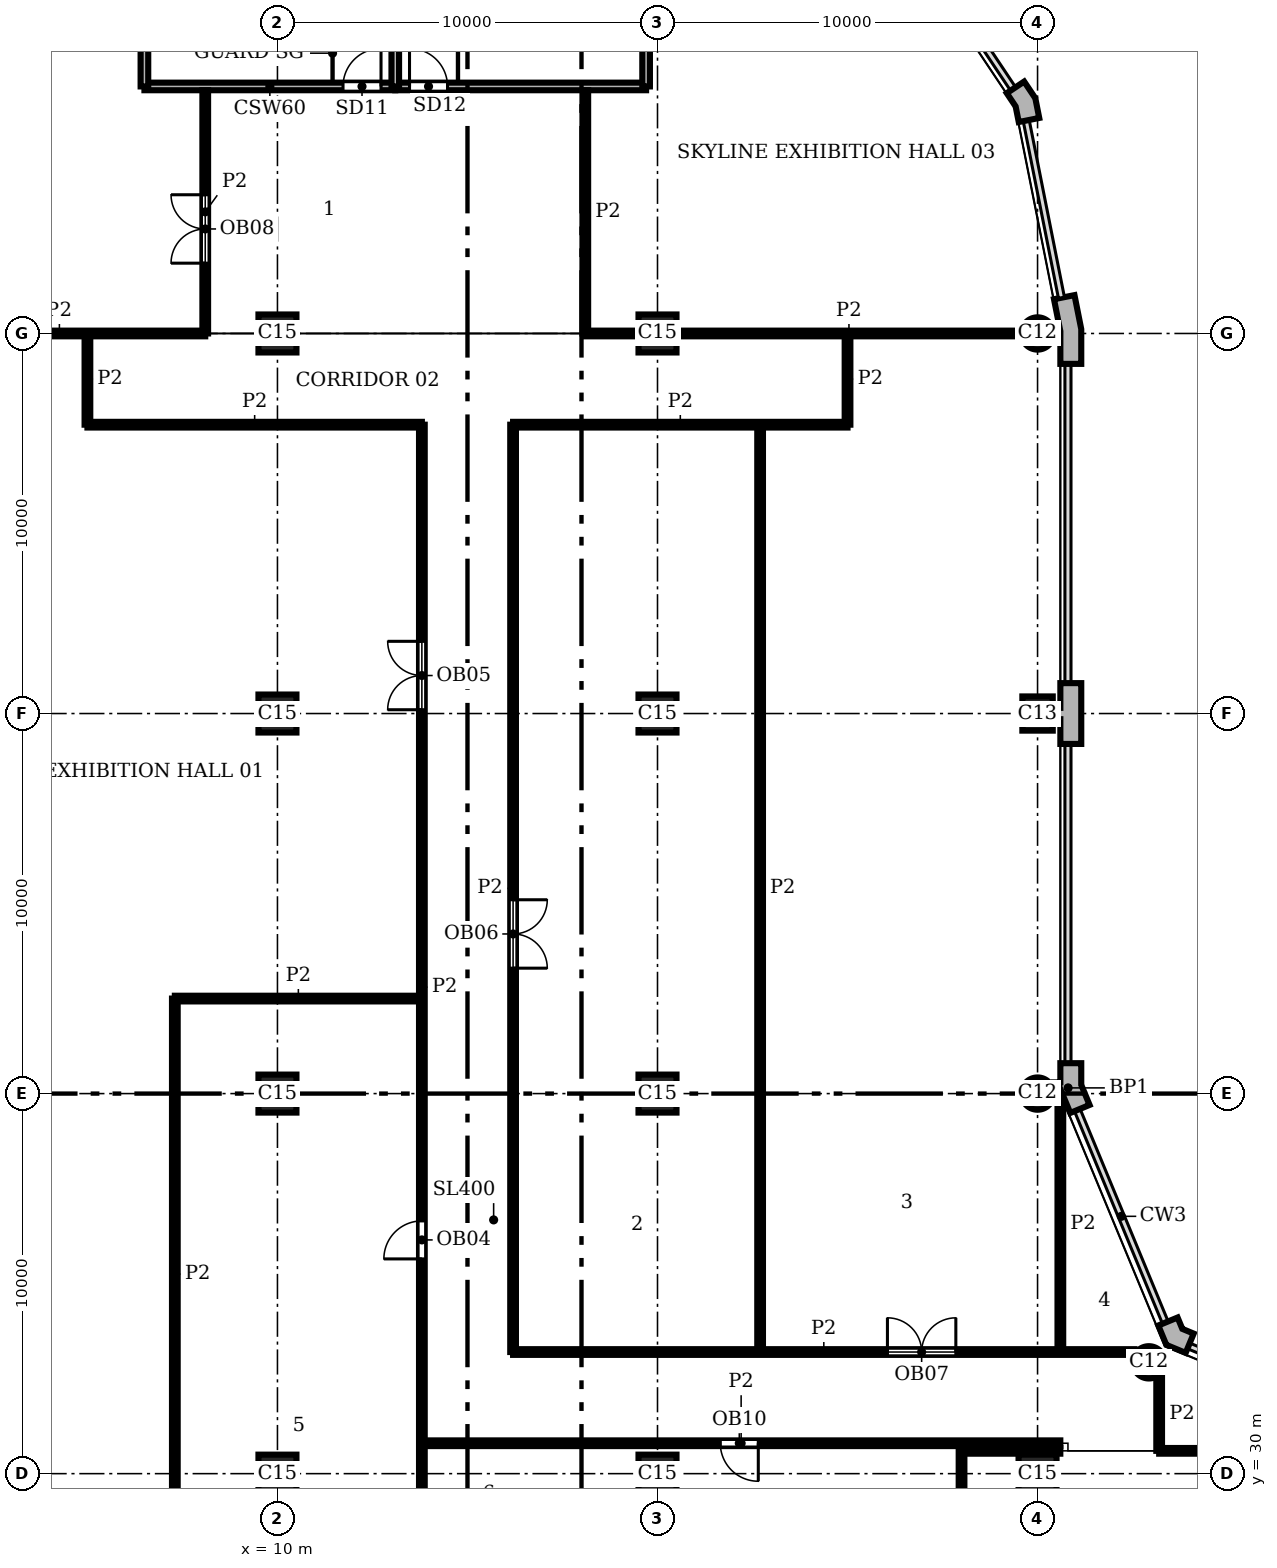
"""IFC4 building model, lengths in metres.
Left out: names, types, materials, properties, quantities, classifications, styles, units other than length and angle.
Written with IfcOpenShell. Run it as: python <this file> out.ifc"""

import sys

from ifc_helpers import new_model, si_unit, direction, frame, frame_2d, origin, origin_2d, place, context, subcontext, project, spatial, polyline, rectangle, circle, outline, extrude, element, fill, save


model = new_model("IFC4")
c1 = context("Model", 3, precision=1e-05, world=origin(), true_north=direction((0.0, 1.0)))
c2 = subcontext(c1, "Body", "Model", "MODEL_VIEW")
j1 = project(units=[si_unit("LENGTHUNIT", "METRE"), si_unit("PLANEANGLEUNIT", "RADIAN")], contexts=[c1])
p1 = place(None, origin())
s1 = spatial("IfcSite", under=j1, at=p1, CompositionType="ELEMENT")
p2 = place(p1, origin())
s2 = spatial("IfcBuilding", under=s1, at=p2, CompositionType="ELEMENT")
p3 = place(p2, frame((0.0, 0.0, 358.2)))
s3 = spatial("IfcBuildingStorey", under=s2, at=p3, CompositionType="ELEMENT", Elevation=358.2)
for number, where, z_axis, x_axis in (
    (1, (32.929, 32.929, 0.0), (0.0, 0.0, 1.0), (1.0, 0.0, 0.0)),
    (2, (30.0, 40.0, 0.0), (0.0, 0.0, 1.0), (1.0, 0.0, 0.0)),
):
    element("IfcColumn", number, at=place(p3, frame(where, z_axis=z_axis, x_axis=x_axis)), inside=s3, PredefinedType="COLUMN", context=c2, shape_type="SweptSolid", body=[
        extrude(circle(Radius=0.425, at=origin_2d()), origin(), (0.0, 0.0, 1.0), 7.2),
    ])
p4 = place(p3, frame((30.0, 50.0, 0.0), z_axis=(0.0, 0.0, 1.0), x_axis=(0.0, 1.0, 0.0)))
e3 = element("IfcColumn", 3, at=p4, inside=s3, PredefinedType="COLUMN", context=c2, shape_type="SweptSolid", body=[
    extrude(rectangle(XDim=0.9, YDim=0.8, at=origin_2d()), origin(), (0.0, 0.0, 1.0), 7.2),
])
p5 = place(p3, frame((30.0, 60.0, 0.0), z_axis=(0.0, 0.0, 1.0), x_axis=(1.0, 0.0, 0.0)))
e4 = element("IfcColumn", 4, at=p5, inside=s3, PredefinedType="COLUMN", context=c2, shape_type="SweptSolid", body=[
    extrude(circle(Radius=0.425, at=origin_2d()), origin(), (0.0, 0.0, 1.0), 7.2),
])
for number, where, z_axis, x_axis in (
    (5, (10.0, 30.0, 0.0), (0.0, 0.0, 1.0), (1.0, 0.0, 0.0)),
    (6, (10.0, 40.0, 0.0), (0.0, 0.0, 1.0), (1.0, 0.0, 0.0)),
    (7, (10.0, 50.0, 0.0), (0.0, 0.0, 1.0), (1.0, 0.0, 0.0)),
    (8, (10.0, 60.0, 0.0), (0.0, 0.0, 1.0), (1.0, 0.0, 0.0)),
    (9, (20.0, 30.0, 0.0), (0.0, 0.0, 1.0), (1.0, 0.0, 0.0)),
    (10, (20.0, 40.0, 0.0), (0.0, 0.0, 1.0), (1.0, 0.0, 0.0)),
    (11, (20.0, 50.0, 0.0), (0.0, 0.0, 1.0), (1.0, 0.0, 0.0)),
    (12, (20.0, 60.0, 0.0), (0.0, 0.0, 1.0), (1.0, 0.0, 0.0)),
    (13, (30.0, 30.0, 0.0), (0.0, 0.0, 1.0), (1.0, 0.0, 0.0)),
):
    element("IfcColumn", number, at=place(p3, frame(where, z_axis=z_axis, x_axis=x_axis)), inside=s3, PredefinedType="COLUMN", context=c2, shape_type="SweptSolid", body=[
        extrude(rectangle(XDim=1.0, YDim=1.0, at=origin_2d()), origin(), (0.0, 0.0, 1.0), 7.2),
    ])
p6 = place(p3, origin())
e14 = element("IfcWall", 14, at=p6, inside=s3, PredefinedType="SOLIDWALL", context=c2, shape_type="SweptSolid", body=[
    extrude(outline(polyline([(34.051, 33.547), (34.108, 33.685), (33.809, 33.809), (33.685, 34.108), (33.547, 34.051), (33.177, 33.898), (33.388, 33.388), (33.898, 33.177), (34.051, 33.547)])), origin(), (0.0, 0.0, 1.0), 7.2),
])
e15 = element("IfcWall", 15, at=p6, inside=s3, PredefinedType="SOLIDWALL", context=c2, shape_type="SweptSolid", body=[
    extrude(outline(polyline([(30.62, 39.995), (30.62, 40.071), (30.861, 39.49), (31.23, 39.644), (31.369, 39.701), (31.15, 40.229), (31.15, 40.8), (31.0, 40.8), (30.6, 40.8), (30.6, 40.295), (30.425, 40.295), (30.425, 39.995), (30.62, 39.995)])), origin(), (0.0, 0.0, 1.0), 7.2),
])
e16 = element("IfcWall", 16, at=p6, inside=s3, PredefinedType="SOLIDWALL", context=c2, shape_type="SweptSolid", body=[
    extrude(outline(polyline([(30.0, 49.85), (30.6, 49.85), (30.6, 49.2), (31.0, 49.2), (31.15, 49.2), (31.15, 50.0), (31.15, 50.8), (31.0, 50.8), (30.6, 50.8), (30.6, 50.15), (30.0, 50.15), (30.0, 49.85)])), origin(), (0.0, 0.0, 1.0), 7.2),
])
e17 = element("IfcWall", 17, at=p6, inside=s3, PredefinedType="SOLIDWALL", context=c2, shape_type="SweptSolid", body=[
    extrude(outline(polyline([(31.0, 59.2), (31.15, 59.2), (31.15, 60.113), (30.972, 61.009), (30.825, 60.98), (30.432, 60.902), (30.6, 60.059), (30.6, 59.2), (31.0, 59.2)])), origin(), (0.0, 0.0, 1.0), 7.2),
])
e18 = element("IfcWall", 18, at=p6, inside=s3, PredefinedType="SOLIDWALL", context=c2, shape_type="SweptSolid", body=[
    extrude(outline(polyline([(29.897, 65.641), (30.045, 65.67), (29.941, 66.189), (29.648, 66.629), (29.523, 66.545), (29.19, 66.323), (29.423, 65.974), (29.505, 65.563), (29.897, 65.641)])), origin(), (0.0, 0.0, 1.0), 7.2),
])
p7 = place(p3, frame((6.5, 66.5, 0.0), z_axis=(0.0, 0.0, 1.0), x_axis=(1.0, 0.0, 0.0)))
e19 = element("IfcWall", 19, at=p7, inside=s3, PredefinedType="SHEAR", context=c2, shape_type="SweptSolid", body=[
    extrude(rectangle(XDim=6.6, YDim=0.2, at=frame_2d((3.3, 0.0))), origin(), (0.0, 0.0, 1.0), 6.75),
])
p8 = place(p7, frame((5.225, 0.0, 0.0)))
e20 = element("IfcOpeningElement", 20, at=p8, cuts=e19, PredefinedType="OPENING", context=c2, shape_type="SweptSolid", body=[
    extrude(rectangle(XDim=1.0, YDim=2.1, at=frame_2d((0.5, 1.05))), frame((0.0, 0.11, 0.0), z_axis=(0.0, -1.0, 0.0), x_axis=(1.0, 0.0, 0.0)), (0.0, 0.0, 1.0), 0.22),
])
p9 = place(p3, frame((13.1, 66.5, 0.0), z_axis=(0.0, 0.0, 1.0), x_axis=(1.0, 0.0, 0.0)))
e21 = element("IfcWall", 21, at=p9, inside=s3, PredefinedType="SHEAR", context=c2, shape_type="SweptSolid", body=[
    extrude(rectangle(XDim=6.6, YDim=0.2, at=frame_2d((3.3, 0.0))), origin(), (0.0, 0.0, 1.0), 6.75),
])
p10 = place(p9, frame((0.375, 0.0, 0.0)))
e22 = element("IfcOpeningElement", 22, at=p10, cuts=e21, PredefinedType="OPENING", context=c2, shape_type="SweptSolid", body=[
    extrude(rectangle(XDim=1.0, YDim=2.1, at=frame_2d((0.5, 1.05))), frame((0.0, 0.11, 0.0), z_axis=(0.0, -1.0, 0.0), x_axis=(1.0, 0.0, 0.0)), (0.0, 0.0, 1.0), 0.22),
])
for number, where, z_axis, x_axis in (
    (23, (6.5, 66.5, 0.0), (0.0, 0.0, 1.0), (0.0, 1.0, 0.0)),
    (24, (13.1, 66.5, 0.0), (0.0, 0.0, 1.0), (0.0, 1.0, 0.0)),
    (25, (19.7, 66.5, 0.0), (0.0, 0.0, 1.0), (0.0, 1.0, 0.0)),
):
    element("IfcWall", number, at=place(p3, frame(where, z_axis=z_axis, x_axis=x_axis)), inside=s3, PredefinedType="SHEAR", context=c2, shape_type="SweptSolid", body=[
        extrude(rectangle(XDim=3.3, YDim=0.2, at=frame_2d((1.65, 0.0))), origin(), (0.0, 0.0, 1.0), 6.75),
    ])
p11 = place(p3, frame((5.0, 57.6, 0.0), z_axis=(0.0, 0.0, 1.0), x_axis=(0.0, 1.0, 0.0)))
e26 = element("IfcWall", 26, at=p11, inside=s3, PredefinedType="PARTITIONING", context=c2, shape_type="SweptSolid", body=[
    extrude(rectangle(XDim=2.4, YDim=0.15, at=frame_2d((1.2, 0.0))), origin(), (0.0, 0.0, 1.0), 6.75),
])
p12 = place(p3, frame((7.3, 28.0, 0.0), z_axis=(0.0, 0.0, 1.0), x_axis=(0.0, 1.0, 0.0)))
e27 = element("IfcWall", 27, at=p12, inside=s3, PredefinedType="PARTITIONING", context=c2, shape_type="SweptSolid", body=[
    extrude(rectangle(XDim=14.5, YDim=0.15, at=frame_2d((7.25, 0.0))), origin(), (0.0, 0.0, 1.0), 6.75),
])
p13 = place(p3, frame((8.1, 60.0, 0.0), z_axis=(0.0, 0.0, 1.0), x_axis=(0.0, 1.0, 0.0)))
e28 = element("IfcWall", 28, at=p13, inside=s3, PredefinedType="PARTITIONING", context=c2, shape_type="SweptSolid", body=[
    extrude(rectangle(XDim=6.4, YDim=0.15, at=frame_2d((3.2, 0.0))), origin(), (0.0, 0.0, 1.0), 6.75),
])
p14 = place(p13, frame((1.85, 0.0, 0.0)))
e29 = element("IfcOpeningElement", 29, at=p14, cuts=e28, PredefinedType="OPENING", context=c2, shape_type="SweptSolid", body=[
    extrude(rectangle(XDim=1.8, YDim=2.1, at=frame_2d((0.9, 1.05))), frame((0.0, 0.085, 0.0), z_axis=(0.0, -1.0, 0.0), x_axis=(1.0, 0.0, 0.0)), (0.0, 0.0, 1.0), 0.17),
])
p15 = place(p3, frame((13.8, 28.0, 0.0), z_axis=(0.0, 0.0, 1.0), x_axis=(0.0, 1.0, 0.0)))
e30 = element("IfcWall", 30, at=p15, inside=s3, PredefinedType="PARTITIONING", context=c2, shape_type="SweptSolid", body=[
    extrude(rectangle(XDim=29.6, YDim=0.15, at=frame_2d((14.8, 0.0))), origin(), (0.0, 0.0, 1.0), 6.75),
])
p16 = place(p15, frame((7.65, 0.0, 0.0)))
e31 = element("IfcOpeningElement", 31, at=p16, cuts=e30, PredefinedType="OPENING", context=c2, shape_type="SweptSolid", body=[
    extrude(rectangle(XDim=1.0, YDim=2.1, at=frame_2d((0.5, 1.05))), frame((0.0, 0.085, 0.0), z_axis=(0.0, -1.0, 0.0), x_axis=(1.0, 0.0, 0.0)), (0.0, 0.0, 1.0), 0.17),
])
p17 = place(p15, frame((22.1, 0.0, 0.0)))
e32 = element("IfcOpeningElement", 32, at=p17, cuts=e30, PredefinedType="OPENING", context=c2, shape_type="SweptSolid", body=[
    extrude(rectangle(XDim=1.8, YDim=2.1, at=frame_2d((0.9, 1.05))), frame((0.0, 0.085, 0.0), z_axis=(0.0, -1.0, 0.0), x_axis=(1.0, 0.0, 0.0)), (0.0, 0.0, 1.0), 0.17),
])
p18 = place(p3, frame((16.2, 33.2, 0.0), z_axis=(0.0, 0.0, 1.0), x_axis=(0.0, 1.0, 0.0)))
e33 = element("IfcWall", 33, at=p18, inside=s3, PredefinedType="PARTITIONING", context=c2, shape_type="SweptSolid", body=[
    extrude(rectangle(XDim=24.4, YDim=0.15, at=frame_2d((12.2, 0.0))), origin(), (0.0, 0.0, 1.0), 6.75),
])
p19 = place(p18, frame((10.1, 0.0, 0.0)))
e34 = element("IfcOpeningElement", 34, at=p19, cuts=e33, PredefinedType="OPENING", context=c2, shape_type="SweptSolid", body=[
    extrude(rectangle(XDim=1.8, YDim=2.1, at=frame_2d((0.9, 1.05))), frame((0.0, 0.085, 0.0), z_axis=(0.0, -1.0, 0.0), x_axis=(1.0, 0.0, 0.0)), (0.0, 0.0, 1.0), 0.17),
])
p20 = place(p3, frame((18.1, 60.0, 0.0), z_axis=(0.0, 0.0, 1.0), x_axis=(0.0, 1.0, 0.0)))
e35 = element("IfcWall", 35, at=p20, inside=s3, PredefinedType="PARTITIONING", context=c2, shape_type="SweptSolid", body=[
    extrude(rectangle(XDim=6.4, YDim=0.15, at=frame_2d((3.2, 0.0))), origin(), (0.0, 0.0, 1.0), 6.75),
])
p21 = place(p3, frame((22.7, 33.2, 0.0), z_axis=(0.0, 0.0, 1.0), x_axis=(0.0, 1.0, 0.0)))
e36 = element("IfcWall", 36, at=p21, inside=s3, PredefinedType="PARTITIONING", context=c2, shape_type="SweptSolid", body=[
    extrude(rectangle(XDim=24.4, YDim=0.15, at=frame_2d((12.2, 0.0))), origin(), (0.0, 0.0, 1.0), 6.75),
])
p22 = place(p3, frame((25.0, 57.6, 0.0), z_axis=(0.0, 0.0, 1.0), x_axis=(0.0, 1.0, 0.0)))
e37 = element("IfcWall", 37, at=p22, inside=s3, PredefinedType="PARTITIONING", context=c2, shape_type="SweptSolid", body=[
    extrude(rectangle(XDim=2.4, YDim=0.15, at=frame_2d((1.2, 0.0))), origin(), (0.0, 0.0, 1.0), 6.75),
])
p23 = place(p3, frame((28.0, 28.0, 0.0), z_axis=(0.0, 0.0, 1.0), x_axis=(0.0, 1.0, 0.0)))
e38 = element("IfcWall", 38, at=p23, inside=s3, PredefinedType="PARTITIONING", context=c2, shape_type="SweptSolid", body=[
    extrude(rectangle(XDim=2.598, YDim=0.15, at=frame_2d((1.299, 0.0))), origin(), (0.0, 0.0, 1.0), 6.75),
])
p24 = place(p3, frame((30.6, 33.2, 0.0), z_axis=(0.0, 0.0, 1.0), x_axis=(0.0, 1.0, 0.0)))
e39 = element("IfcWall", 39, at=p24, inside=s3, PredefinedType="PARTITIONING", context=c2, shape_type="SweptSolid", body=[
    extrude(rectangle(XDim=6.738, YDim=0.15, at=frame_2d((3.369, 0.0))), origin(), (0.0, 0.0, 1.0), 6.75),
])
p25 = place(p3, frame((33.2, 30.6, 0.0), z_axis=(0.0, 0.0, 1.0), x_axis=(0.0, 1.0, 0.0)))
e40 = element("IfcWall", 40, at=p25, inside=s3, PredefinedType="PARTITIONING", context=c2, shape_type="SweptSolid", body=[
    extrude(rectangle(XDim=1.952, YDim=0.15, at=frame_2d((0.976, 0.0))), origin(), (0.0, 0.0, 1.0), 6.75),
])
p26 = place(p3, frame((28.002, 30.6, 0.0), z_axis=(0.0, 0.0, 1.0), x_axis=(1.0, 0.0, 0.0)))
e41 = element("IfcWall", 41, at=p26, inside=s3, PredefinedType="PARTITIONING", context=c2, shape_type="SweptSolid", body=[
    extrude(rectangle(XDim=2.597, YDim=0.15, at=frame_2d((1.299, 0.0))), origin(), (0.0, 0.0, 1.0), 6.75),
])
p27 = place(p3, frame((33.2, 30.6, 0.0), z_axis=(0.0, 0.0, 1.0), x_axis=(1.0, 0.0, 0.0)))
e42 = element("IfcWall", 42, at=p27, inside=s3, PredefinedType="PARTITIONING", context=c2, shape_type="SweptSolid", body=[
    extrude(rectangle(XDim=6.738, YDim=0.15, at=frame_2d((3.369, 0.0))), origin(), (0.0, 0.0, 1.0), 6.75),
])
p28 = place(p27, frame((1.6, 0.0, 0.0)))
e43 = element("IfcOpeningElement", 43, at=p28, cuts=e42, PredefinedType="OPENING", context=c2, shape_type="SweptSolid", body=[
    extrude(rectangle(XDim=1.0, YDim=2.1, at=frame_2d((0.5, 1.05))), frame((0.0, 0.085, 0.0), z_axis=(0.0, -1.0, 0.0), x_axis=(1.0, 0.0, 0.0)), (0.0, 0.0, 1.0), 0.17),
])
p29 = place(p3, frame((13.802, 30.8, 0.0), z_axis=(0.0, 0.0, 1.0), x_axis=(1.0, 0.0, 0.0)))
e44 = element("IfcWall", 44, at=p29, inside=s3, PredefinedType="PARTITIONING", context=c2, shape_type="SweptSolid", body=[
    extrude(rectangle(XDim=16.797, YDim=0.15, at=frame_2d((8.398, 0.0))), origin(), (0.0, 0.0, 1.0), 6.75),
])
p30 = place(p29, frame((7.85, 0.0, 0.0)))
e45 = element("IfcOpeningElement", 45, at=p30, cuts=e44, PredefinedType="OPENING", context=c2, shape_type="SweptSolid", body=[
    extrude(rectangle(XDim=1.0, YDim=2.1, at=frame_2d((0.5, 1.05))), frame((0.0, 0.085, 0.0), z_axis=(0.0, -1.0, 0.0), x_axis=(1.0, 0.0, 0.0)), (0.0, 0.0, 1.0), 0.17),
])
p31 = place(p3, frame((16.2, 33.2, 0.0), z_axis=(0.0, 0.0, 1.0), x_axis=(1.0, 0.0, 0.0)))
e46 = element("IfcWall", 46, at=p31, inside=s3, PredefinedType="PARTITIONING", context=c2, shape_type="SweptSolid", body=[
    extrude(rectangle(XDim=16.352, YDim=0.15, at=frame_2d((8.176, 0.0))), origin(), (0.0, 0.0, 1.0), 6.75),
])
p32 = place(p31, frame((9.85, 0.0, 0.0)))
e47 = element("IfcOpeningElement", 47, at=p32, cuts=e46, PredefinedType="OPENING", context=c2, shape_type="SweptSolid", body=[
    extrude(rectangle(XDim=1.8, YDim=2.1, at=frame_2d((0.9, 1.05))), frame((0.0, 0.085, 0.0), z_axis=(0.0, -1.0, 0.0), x_axis=(1.0, 0.0, 0.0)), (0.0, 0.0, 1.0), 0.17),
])
p33 = place(p3, frame((7.3, 42.5, 0.0), z_axis=(0.0, 0.0, 1.0), x_axis=(1.0, 0.0, 0.0)))
e48 = element("IfcWall", 48, at=p33, inside=s3, PredefinedType="PARTITIONING", context=c2, shape_type="SweptSolid", body=[
    extrude(rectangle(XDim=6.5, YDim=0.15, at=frame_2d((3.25, 0.0))), origin(), (0.0, 0.0, 1.0), 6.75),
])
for number, where, z_axis, x_axis in (
    (49, (5.0, 57.6, 0.0), (0.0, 0.0, 1.0), (1.0, 0.0, 0.0)),
    (50, (16.2, 57.6, 0.0), (0.0, 0.0, 1.0), (1.0, 0.0, 0.0)),
):
    element("IfcWall", number, at=place(p3, frame(where, z_axis=z_axis, x_axis=x_axis)), inside=s3, PredefinedType="PARTITIONING", context=c2, shape_type="SweptSolid", body=[
        extrude(rectangle(XDim=8.8, YDim=0.15, at=frame_2d((4.4, 0.0))), origin(), (0.0, 0.0, 1.0), 6.75),
    ])
p34 = place(p3, frame((0.425, 60.0, 0.0), z_axis=(0.0, 0.0, 1.0), x_axis=(1.0, 0.0, 0.0)))
e51 = element("IfcWall", 51, at=p34, inside=s3, PredefinedType="PARTITIONING", context=c2, shape_type="SweptSolid", body=[
    extrude(rectangle(XDim=7.675, YDim=0.15, at=frame_2d((3.837, 0.0))), origin(), (0.0, 0.0, 1.0), 6.75),
])
p35 = place(p3, frame((18.1, 60.0, 0.0), z_axis=(0.0, 0.0, 1.0), x_axis=(1.0, 0.0, 0.0)))
e52 = element("IfcWall", 52, at=p35, inside=s3, PredefinedType="PARTITIONING", context=c2, shape_type="SweptSolid", body=[
    extrude(rectangle(XDim=1.4, YDim=0.15, at=frame_2d((0.7, 0.0))), origin(), (0.0, 0.0, 1.0), 6.75),
])
p36 = place(p3, frame((20.5, 60.0, 0.0), z_axis=(0.0, 0.0, 1.0), x_axis=(1.0, 0.0, 0.0)))
e53 = element("IfcWall", 53, at=p36, inside=s3, PredefinedType="PARTITIONING", context=c2, shape_type="SweptSolid", body=[
    extrude(rectangle(XDim=9.075, YDim=0.15, at=frame_2d((4.538, 0.0))), origin(), (0.0, 0.0, 1.0), 6.75),
])
p37 = place(p8, origin())
e54 = element("IfcDoor", 54, at=p37, inside=s3, OperationType="SINGLE_SWING_RIGHT", PredefinedType="DOOR", context=c2, shape_type="SweptSolid", body=[
    extrude(rectangle(XDim=1.0, YDim=2.1, at=frame_2d((0.5, 1.05))), frame((0.0, 0.025, 0.0), z_axis=(0.0, -1.0, 0.0), x_axis=(1.0, 0.0, 0.0)), (0.0, 0.0, 1.0), 0.05),
])
fill(e20, e54)
p38 = place(p10, origin())
e55 = element("IfcDoor", 55, at=p38, inside=s3, OperationType="SINGLE_SWING_LEFT", PredefinedType="DOOR", context=c2, shape_type="SweptSolid", body=[
    extrude(rectangle(XDim=1.0, YDim=2.1, at=frame_2d((0.5, 1.05))), frame((0.0, 0.025, 0.0), z_axis=(0.0, -1.0, 0.0), x_axis=(1.0, 0.0, 0.0)), (0.0, 0.0, 1.0), 0.05),
])
fill(e22, e55)
p39 = place(p16, origin())
e56 = element("IfcDoor", 56, at=p39, inside=s3, OperationType="SINGLE_SWING_LEFT", PredefinedType="DOOR", context=c2, shape_type="SweptSolid", body=[
    extrude(rectangle(XDim=1.0, YDim=2.1, at=frame_2d((0.5, 1.05))), frame((0.0, 0.025, 0.0), z_axis=(0.0, -1.0, 0.0), x_axis=(1.0, 0.0, 0.0)), (0.0, 0.0, 1.0), 0.05),
])
fill(e31, e56)
p40 = place(p17, origin())
e57 = element("IfcDoor", 57, at=p40, inside=s3, OperationType="DOUBLE_DOOR_SINGLE_SWING", PredefinedType="DOOR", context=c2, shape_type="SweptSolid", body=[
    extrude(rectangle(XDim=1.8, YDim=2.1, at=frame_2d((0.9, 1.05))), frame((0.0, 0.025, 0.0), z_axis=(0.0, -1.0, 0.0), x_axis=(1.0, 0.0, 0.0)), (0.0, 0.0, 1.0), 0.05),
])
fill(e32, e57)
p41 = place(p19, frame((1.8, 0.0, 0.0), z_axis=(0.0, 0.0, 1.0), x_axis=(-1.0, 0.0, 0.0)))
e58 = element("IfcDoor", 58, at=p41, inside=s3, OperationType="DOUBLE_DOOR_SINGLE_SWING", PredefinedType="DOOR", context=c2, shape_type="SweptSolid", body=[
    extrude(rectangle(XDim=1.8, YDim=2.1, at=frame_2d((0.9, 1.05))), frame((0.0, 0.025, 0.0), z_axis=(0.0, -1.0, 0.0), x_axis=(1.0, 0.0, 0.0)), (0.0, 0.0, 1.0), 0.05),
])
fill(e34, e58)
p42 = place(p32, origin())
e59 = element("IfcDoor", 59, at=p42, inside=s3, OperationType="DOUBLE_DOOR_SINGLE_SWING", PredefinedType="DOOR", context=c2, shape_type="SweptSolid", body=[
    extrude(rectangle(XDim=1.8, YDim=2.1, at=frame_2d((0.9, 1.05))), frame((0.0, 0.025, 0.0), z_axis=(0.0, -1.0, 0.0), x_axis=(1.0, 0.0, 0.0)), (0.0, 0.0, 1.0), 0.05),
])
fill(e47, e59)
p43 = place(p14, origin())
e60 = element("IfcDoor", 60, at=p43, inside=s3, OperationType="DOUBLE_DOOR_SINGLE_SWING", PredefinedType="DOOR", context=c2, shape_type="SweptSolid", body=[
    extrude(rectangle(XDim=1.8, YDim=2.1, at=frame_2d((0.9, 1.05))), frame((0.0, 0.025, 0.0), z_axis=(0.0, -1.0, 0.0), x_axis=(1.0, 0.0, 0.0)), (0.0, 0.0, 1.0), 0.05),
])
fill(e29, e60)
p44 = place(p30, frame((1.0, 0.0, 0.0), z_axis=(0.0, 0.0, 1.0), x_axis=(-1.0, 0.0, 0.0)))
e61 = element("IfcDoor", 61, at=p44, inside=s3, OperationType="SINGLE_SWING_LEFT", PredefinedType="DOOR", context=c2, shape_type="SweptSolid", body=[
    extrude(rectangle(XDim=1.0, YDim=2.1, at=frame_2d((0.5, 1.05))), frame((0.0, 0.025, 0.0), z_axis=(0.0, -1.0, 0.0), x_axis=(1.0, 0.0, 0.0)), (0.0, 0.0, 1.0), 0.05),
])
fill(e45, e61)
save(model, sys.argv[1])
